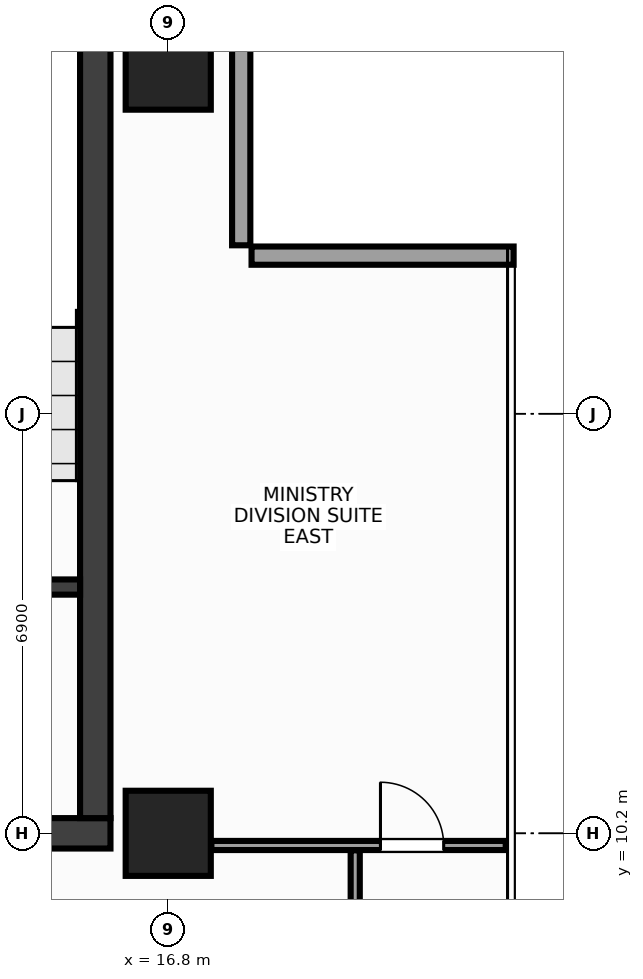
"""IFC4 building model, lengths in metres.
Left out: names, types, materials, properties, quantities, classifications, styles, units other than length and angle.
Written with IfcOpenShell. Run it as: python <this file> out.ifc"""

import sys

from ifc_helpers import new_model, si_unit, direction, frame, frame_2d, origin, origin_2d, place, context, subcontext, project, spatial, rectangle, extrude, source, transform, mapped, element, fill, save


model = new_model("IFC4")
c1 = context("Model", 3, precision=1e-05, world=origin(), true_north=direction((0.0, 1.0)))
c2 = subcontext(c1, "Body", "Model", "MODEL_VIEW")
j1 = project(units=[si_unit("LENGTHUNIT", "METRE"), si_unit("PLANEANGLEUNIT", "RADIAN")], contexts=[c1])
p1 = place(None, origin())
s1 = spatial("IfcSite", under=j1, at=p1, CompositionType="ELEMENT")
p2 = place(p1, origin())
s2 = spatial("IfcBuilding", under=s1, at=p2, CompositionType="ELEMENT")
p3 = place(p2, frame((0.0, 0.0, 243.2)))
s3 = spatial("IfcBuildingStorey", under=s2, at=p3, CompositionType="ELEMENT", Elevation=243.2)
m1 = source(origin(), c2, "Body", "SweptSolid", [
    extrude(rectangle(XDim=31.7, YDim=0.5, at=frame_2d((15.85, 0.0))), origin(), (0.0, 0.0, 1.0), 3.6),
])
p4 = place(p3, frame((-15.85, 10.2, 0.0), z_axis=(0.0, 0.0, 1.0), x_axis=(1.0, 0.0, 0.0)))
e1 = element("IfcWall", 1, at=p4, inside=s3, PredefinedType="SHEAR", context=c2, shape_type="MappedRepresentation", body=[
    mapped(m1, transform((0.0, 0.0, 0.0), x_axis=(1.0, 0.0, 0.0), y_axis=(0.0, 1.0, 0.0), z_axis=(0.0, 0.0, 1.0), scale=1.0)),
])
p5 = place(p4, frame((1.7, 0.0, 0.0)))
e2 = element("IfcOpeningElement", 2, at=p5, cuts=e1, PredefinedType="OPENING", context=c2, shape_type="SweptSolid", body=[
    extrude(rectangle(XDim=1.6, YDim=2.15, at=frame_2d((0.8, 1.075))), frame((0.0, 0.262, 0.0), z_axis=(0.0, -1.0, 0.0), x_axis=(1.0, 0.0, 0.0)), (0.0, 0.0, 1.0), 0.524),
])
p6 = place(p4, frame((28.4, 0.0, 0.0)))
e3 = element("IfcOpeningElement", 3, at=p6, cuts=e1, PredefinedType="OPENING", context=c2, shape_type="SweptSolid", body=[
    extrude(rectangle(XDim=1.6, YDim=2.15, at=frame_2d((0.8, 1.075))), frame((0.0, 0.262, 0.0), z_axis=(0.0, -1.0, 0.0), x_axis=(1.0, 0.0, 0.0)), (0.0, 0.0, 1.0), 0.524),
])
p7 = place(p4, frame((15.1, 0.0, 0.0)))
e4 = element("IfcOpeningElement", 4, at=p7, cuts=e1, PredefinedType="OPENING", context=c2, shape_type="SweptSolid", body=[
    extrude(rectangle(XDim=1.5, YDim=2.2, at=frame_2d((0.75, 1.1))), frame((0.0, 0.262, 0.0), z_axis=(0.0, -1.0, 0.0), x_axis=(1.0, 0.0, 0.0)), (0.0, 0.0, 1.0), 0.524),
])
m2 = source(origin(), c2, "Body", "SweptSolid", [
    extrude(rectangle(XDim=13.1, YDim=0.5, at=frame_2d((6.55, 0.0))), origin(), (0.0, 0.0, 1.0), 3.6),
])
p8 = place(p3, frame((15.6, 10.45, 0.0), z_axis=(0.0, 0.0, 1.0), x_axis=(0.0, 1.0, 0.0)))
e5 = element("IfcWall", 5, at=p8, inside=s3, PredefinedType="SHEAR", context=c2, shape_type="MappedRepresentation", body=[
    mapped(m2, transform((0.0, 0.0, 0.0), x_axis=(1.0, 0.0, 0.0), y_axis=(0.0, 1.0, 0.0), z_axis=(0.0, 0.0, 1.0), scale=1.0)),
])
m3 = source(origin(), c2, "Body", "SweptSolid", [
    extrude(rectangle(XDim=3.705, YDim=0.25, at=frame_2d((1.853, 0.0))), origin(), (0.0, 0.0, 1.0), 3.6),
])
p9 = place(p3, frame((11.645, 14.25, 0.0), z_axis=(0.0, 0.0, 1.0), x_axis=(1.0, 0.0, 0.0)))
e6 = element("IfcWall", 6, at=p9, inside=s3, PredefinedType="SHEAR", context=c2, shape_type="MappedRepresentation", body=[
    mapped(m3, transform((0.0, 0.0, 0.0), x_axis=(1.0, 0.0, 0.0), y_axis=(0.0, 1.0, 0.0), z_axis=(0.0, 0.0, 1.0), scale=1.0)),
])
p10 = place(p9, frame((0.95, 0.0, 0.0)))
e7 = element("IfcOpeningElement", 7, at=p10, cuts=e6, PredefinedType="OPENING", context=c2, shape_type="SweptSolid", body=[
    extrude(rectangle(XDim=1.6, YDim=2.15, at=frame_2d((0.8, 1.075))), frame((0.0, 0.137, 0.0), z_axis=(0.0, -1.0, 0.0), x_axis=(1.0, 0.0, 0.0)), (0.0, 0.0, 1.0), 0.274),
])
m4 = source(origin(), c2, "Body", "SweptSolid", [
    extrude(rectangle(XDim=1.4, YDim=1.4, at=origin_2d()), origin(), (0.0, 0.0, 1.0), 3.6),
])
for number, where, z_axis, x_axis in (
    (8, (16.8, 10.2, 0.0), (0.0, 0.0, 1.0), (1.0, 0.0, 0.0)),
    (9, (16.8, 22.8, 0.0), (0.0, 0.0, 1.0), (1.0, 0.0, 0.0)),
):
    element("IfcColumn", number, at=place(p3, frame(where, z_axis=z_axis, x_axis=x_axis)), inside=s3, PredefinedType="COLUMN", context=c2, shape_type="MappedRepresentation", body=[
        mapped(m4, transform((0.0, 0.0, 0.0), x_axis=(1.0, 0.0, 0.0), y_axis=(0.0, 1.0, 0.0), z_axis=(0.0, 0.0, 1.0), scale=1.0)),
    ])
m5 = source(origin(), c2, "Body", "SweptSolid", [
    extrude(rectangle(XDim=4.31, YDim=0.3, at=frame_2d((2.155, 0.0))), origin(), (0.0, 0.0, 1.0), 2.75),
])
p11 = place(p3, frame((22.48, 19.7, 0.0), z_axis=(0.0, 0.0, 1.0), x_axis=(-1.0, 0.0, 0.0)))
e10 = element("IfcWall", 10, at=p11, inside=s3, PredefinedType="STANDARD", context=c2, shape_type="MappedRepresentation", body=[
    mapped(m5, transform((0.0, 0.0, 0.0), x_axis=(1.0, 0.0, 0.0), y_axis=(0.0, 1.0, 0.0), z_axis=(0.0, 0.0, 1.0), scale=1.0)),
])
m6 = source(origin(), c2, "Body", "SweptSolid", [
    extrude(rectangle(XDim=4.31, YDim=0.3, at=frame_2d((2.155, 0.0))), origin(), (0.0, 0.0, 1.0), 2.75),
])
p12 = place(p3, frame((18.0, 19.87, 0.0), z_axis=(0.0, 0.0, 1.0), x_axis=(0.0, 1.0, 0.0)))
e11 = element("IfcWall", 11, at=p12, inside=s3, PredefinedType="STANDARD", context=c2, shape_type="MappedRepresentation", body=[
    mapped(m6, transform((0.0, 0.0, 0.0), x_axis=(1.0, 0.0, 0.0), y_axis=(0.0, 1.0, 0.0), z_axis=(0.0, 0.0, 1.0), scale=1.0)),
])
m7 = source(origin(), c2, "Body", "SweptSolid", [
    extrude(rectangle(XDim=4.84, YDim=0.15, at=frame_2d((2.42, 0.0))), origin(), (0.0, 0.0, 1.0), 3.37),
])
p13 = place(p3, frame((17.51, 10.0, 0.0), z_axis=(0.0, 0.0, 1.0), x_axis=(1.0, 0.0, 0.0)))
e12 = element("IfcWall", 12, at=p13, inside=s3, PredefinedType="PARTITIONING", context=c2, shape_type="MappedRepresentation", body=[
    mapped(m7, transform((0.0, 0.0, 0.0), x_axis=(1.0, 0.0, 0.0), y_axis=(0.0, 1.0, 0.0), z_axis=(0.0, 0.0, 1.0), scale=1.0)),
])
p14 = place(p13, frame((2.78, 0.0, 0.0)))
e13 = element("IfcOpeningElement", 13, at=p14, cuts=e12, PredefinedType="OPENING", context=c2, shape_type="SweptSolid", body=[
    extrude(rectangle(XDim=1.04, YDim=2.2, at=frame_2d((0.52, 1.1))), frame((0.0, 0.087, 0.0), z_axis=(0.0, -1.0, 0.0), x_axis=(1.0, 0.0, 0.0)), (0.0, 0.0, 1.0), 0.174),
])
m8 = source(origin(), c2, "Body", "SweptSolid", [
    extrude(rectangle(XDim=2.115, YDim=0.15, at=frame_2d((1.058, 0.0))), origin(), (0.0, 0.0, 1.0), 3.37),
])
p15 = place(p3, frame((19.875, 7.805, 0.0), z_axis=(0.0, 0.0, 1.0), x_axis=(0.0, 1.0, 0.0)))
e14 = element("IfcWall", 14, at=p15, inside=s3, PredefinedType="PARTITIONING", context=c2, shape_type="MappedRepresentation", body=[
    mapped(m8, transform((0.0, 0.0, 0.0), x_axis=(1.0, 0.0, 0.0), y_axis=(0.0, 1.0, 0.0), z_axis=(0.0, 0.0, 1.0), scale=1.0)),
])
m9 = source(origin(), c2, "Body", "SweptSolid", [
    extrude(rectangle(XDim=1.04, YDim=2.2, at=frame_2d((0.52, 1.1))), frame((0.0, 0.025, 0.0), z_axis=(0.0, -1.0, 0.0), x_axis=(1.0, 0.0, 0.0)), (0.0, 0.0, 1.0), 0.05),
])
p16 = place(p14, origin())
e15 = element("IfcDoor", 15, at=p16, inside=s3, OperationType="SINGLE_SWING_LEFT", PredefinedType="DOOR", context=c2, shape_type="MappedRepresentation", body=[
    mapped(m9, transform((0.0, 0.0, 0.0), x_axis=(1.0, 0.0, 0.0), y_axis=(0.0, 1.0, 0.0), z_axis=(0.0, 0.0, 1.0), scale=1.0)),
])
fill(e13, e15)
save(model, sys.argv[1])
